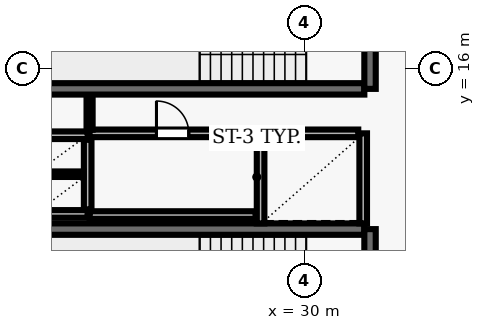
"""IFC4 building model, lengths in metres.
Left out: names, types, materials, properties, quantities, classifications, styles, units other than length and angle.
Written with IfcOpenShell. Run it as: python <this file> out.ifc"""

import sys

from ifc_helpers import new_model, si_unit, direction, frame, frame_2d, origin, place, context, subcontext, project, spatial, rectangle, extrude, element, fill, save


model = new_model("IFC4")
c1 = context("Model", 3, precision=1e-05, world=origin(), true_north=direction((0.0, 1.0)))
c2 = subcontext(c1, "Body", "Model", "MODEL_VIEW")
j1 = project(units=[si_unit("LENGTHUNIT", "METRE"), si_unit("PLANEANGLEUNIT", "RADIAN")], contexts=[c1])
p1 = place(None, origin())
s1 = spatial("IfcSite", under=j1, at=p1, CompositionType="ELEMENT")
p2 = place(p1, origin())
s2 = spatial("IfcBuilding", under=s1, at=p2, CompositionType="ELEMENT")
p3 = place(p2, frame((0.0, 0.0, 34.9)))
s3 = spatial("IfcBuildingStorey", under=s2, at=p3, CompositionType="ELEMENT", Elevation=34.9)
p4 = place(p3, frame((23.22, 15.47, 0.0), z_axis=(0.0, 0.0, 1.0), x_axis=(1.0, 0.0, 0.0)))
e1 = element("IfcWall", 1, at=p4, inside=s3, PredefinedType="SHEAR", context=c2, shape_type="SweptSolid", body=[
    extrude(rectangle(XDim=8.36, YDim=0.3, at=frame_2d((4.18, 0.0))), origin(), (0.0, 0.0, 1.0), 3.69),
])
p5 = place(p3, frame((31.73, 15.47, 0.0), z_axis=(0.0, 0.0, 1.0), x_axis=(0.0, 1.0, 0.0)))
e2 = element("IfcWall", 2, at=p5, inside=s3, PredefinedType="SHEAR", context=c2, shape_type="SweptSolid", body=[
    extrude(rectangle(XDim=3.51, YDim=0.3, at=frame_2d((1.755, 0.0))), origin(), (0.0, 0.0, 1.0), 3.69),
])
p6 = place(p5, frame((1.18, 0.0, 0.0)))
e3 = element("IfcOpeningElement", 3, at=p6, cuts=e2, PredefinedType="OPENING", context=c2, shape_type="SweptSolid", body=[
    extrude(rectangle(XDim=1.15, YDim=2.15, at=frame_2d((0.575, 1.075))), frame((0.0, 0.16, 0.0), z_axis=(0.0, -1.0, 0.0), x_axis=(1.0, 0.0, 0.0)), (0.0, 0.0, 1.0), 0.32),
])
p7 = place(p3, frame((31.58, 11.78, 0.0), z_axis=(0.0, 0.0, 1.0), x_axis=(-1.0, 0.0, 0.0)))
e4 = element("IfcWall", 4, at=p7, inside=s3, PredefinedType="SHEAR", context=c2, shape_type="SweptSolid", body=[
    extrude(rectangle(XDim=8.36, YDim=0.3, at=frame_2d((4.18, 0.0))), origin(), (0.0, 0.0, 1.0), 3.69),
])
p8 = place(p3, frame((31.73, 8.27, 0.0), z_axis=(0.0, 0.0, 1.0), x_axis=(0.0, 1.0, 0.0)))
e5 = element("IfcWall", 5, at=p8, inside=s3, PredefinedType="SHEAR", context=c2, shape_type="SweptSolid", body=[
    extrude(rectangle(XDim=3.51, YDim=0.3, at=frame_2d((1.755, 0.0))), origin(), (0.0, 0.0, 1.0), 3.69),
])
p9 = place(p8, frame((1.18, 0.0, 0.0)))
e6 = element("IfcOpeningElement", 6, at=p9, cuts=e5, PredefinedType="OPENING", context=c2, shape_type="SweptSolid", body=[
    extrude(rectangle(XDim=1.15, YDim=2.15, at=frame_2d((0.575, 1.075))), frame((0.0, 0.16, 0.0), z_axis=(0.0, -1.0, 0.0), x_axis=(1.0, 0.0, 0.0)), (0.0, 0.0, 1.0), 0.32),
])
for number, where, z_axis, x_axis in (
    (7, (28.85, 14.3, 0.0), (0.0, 0.0, 1.0), (0.0, -1.0, 0.0)),
    (8, (31.55, 11.93, 0.0), (0.0, 0.0, 1.0), (0.0, 1.0, 0.0)),
):
    element("IfcWall", number, at=place(p3, frame(where, z_axis=z_axis, x_axis=x_axis)), inside=s3, PredefinedType="SOLIDWALL", context=c2, shape_type="SweptSolid", body=[
        extrude(rectangle(XDim=2.37, YDim=0.2, at=frame_2d((1.185, 0.0))), origin(), (0.0, 0.0, 1.0), 3.69),
    ])
p10 = place(p3, frame((31.42, 14.3, 0.0), z_axis=(0.0, 0.0, 1.0), x_axis=(-1.0, 0.0, 0.0)))
e9 = element("IfcWall", 9, at=p10, inside=s3, PredefinedType="SOLIDWALL", context=c2, shape_type="SweptSolid", body=[
    extrude(rectangle(XDim=2.44, YDim=0.2, at=frame_2d((1.22, 0.0))), origin(), (0.0, 0.0, 1.0), 3.69),
])
for number, where, z_axis, x_axis in (
    (10, (22.9, 14.25, 0.0), (0.0, 0.0, 1.0), (1.0, 0.0, 0.0)),
    (11, (22.9, 12.18, 0.0), (0.0, 0.0, 1.0), (1.0, 0.0, 0.0)),
):
    element("IfcWall", number, at=place(p3, frame(where, z_axis=z_axis, x_axis=x_axis)), inside=s3, PredefinedType="SOLIDWALL", context=c2, shape_type="SweptSolid", body=[
        extrude(rectangle(XDim=1.4, YDim=0.2, at=frame_2d((0.7, 0.0))), origin(), (0.0, 0.0, 1.0), 3.69),
    ])
p11 = place(p3, frame((24.3, 12.3, 0.0), z_axis=(0.0, 0.0, 1.0), x_axis=(0.0, 1.0, 0.0)))
e12 = element("IfcWall", 12, at=p11, inside=s3, PredefinedType="SOLIDWALL", context=c2, shape_type="SweptSolid", body=[
    extrude(rectangle(XDim=1.83, YDim=0.2, at=frame_2d((0.915, 0.0))), origin(), (0.0, 0.0, 1.0), 3.69),
])
p12 = place(p3, frame((23.01, 13.225, 0.0), z_axis=(0.0, 0.0, 1.0), x_axis=(1.0, 0.0, 0.0)))
e13 = element("IfcWall", 13, at=p12, inside=s3, PredefinedType="PARTITIONING", context=c2, shape_type="SweptSolid", body=[
    extrude(rectangle(XDim=1.18, YDim=0.145, at=frame_2d((0.59, 0.0))), origin(), (0.0, 0.0, 1.0), 3.69),
])
p13 = place(p3, frame((24.35, 12.15, 0.0), z_axis=(0.0, 0.0, 1.0), x_axis=(1.0, 0.0, 0.0)))
e14 = element("IfcWall", 14, at=p13, inside=s3, PredefinedType="SOLIDWALL", context=c2, shape_type="SweptSolid", body=[
    extrude(rectangle(XDim=4.37, YDim=0.2, at=frame_2d((2.185, 0.0))), origin(), (0.0, 0.0, 1.0), 3.69),
])
p14 = place(p3, frame((24.35, 14.3, 0.0), z_axis=(0.0, 0.0, 1.0), x_axis=(1.0, 0.0, 0.0)))
e15 = element("IfcWall", 15, at=p14, inside=s3, PredefinedType="SOLIDWALL", context=c2, shape_type="SweptSolid", body=[
    extrude(rectangle(XDim=4.37, YDim=0.2, at=frame_2d((2.185, 0.0))), origin(), (0.0, 0.0, 1.0), 3.69),
])
p15 = place(p14, frame((1.76, 0.0, 0.0)))
e16 = element("IfcOpeningElement", 16, at=p15, cuts=e15, PredefinedType="OPENING", context=c2, shape_type="SweptSolid", body=[
    extrude(rectangle(XDim=0.85, YDim=2.1, at=frame_2d((0.425, 1.05))), frame((0.0, 0.11, 0.0), z_axis=(0.0, -1.0, 0.0), x_axis=(1.0, 0.0, 0.0)), (0.0, 0.0, 1.0), 0.22),
])
p16 = place(p3, frame((24.35, 15.29, 0.0), z_axis=(0.0, 0.0, 1.0), x_axis=(0.0, -1.0, 0.0)))
e17 = element("IfcWall", 17, at=p16, inside=s3, PredefinedType="PARTITIONING", context=c2, shape_type="SweptSolid", body=[
    extrude(rectangle(XDim=0.895, YDim=0.16, at=frame_2d((0.448, 0.0))), origin(), (0.0, 0.0, 1.0), 3.69),
])
p17 = place(p15, origin())
e18 = element("IfcDoor", 18, at=p17, inside=s3, OperationType="SINGLE_SWING_LEFT", PredefinedType="DOOR", context=c2, shape_type="SweptSolid", body=[
    extrude(rectangle(XDim=0.85, YDim=2.1, at=frame_2d((0.425, 1.05))), frame((0.0, 0.025, 0.0), z_axis=(0.0, -1.0, 0.0), x_axis=(1.0, 0.0, 0.0)), (0.0, 0.0, 1.0), 0.05),
])
fill(e16, e18)
save(model, sys.argv[1])
